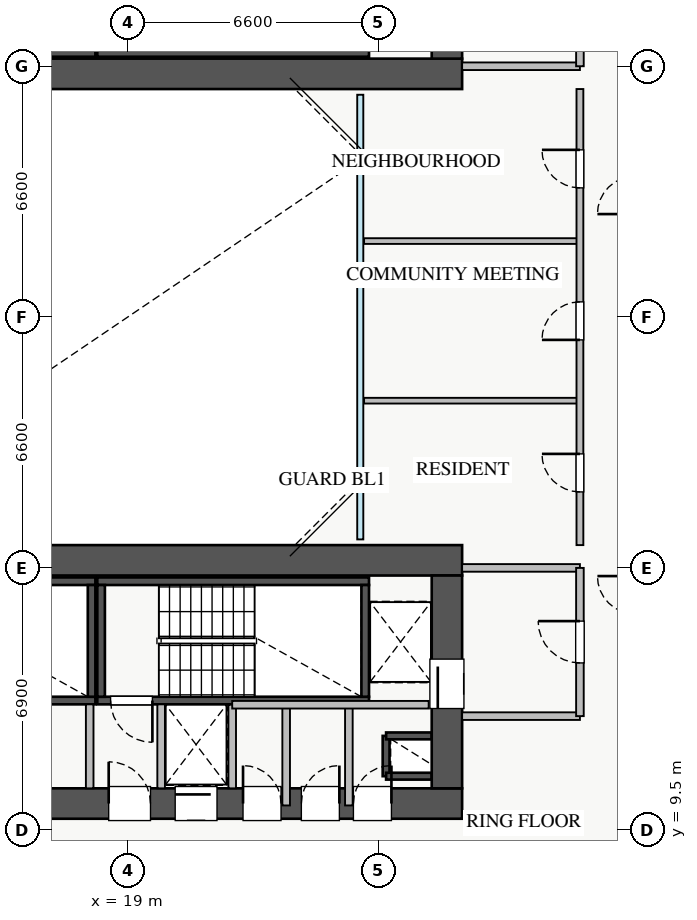
"""IFC4 building model, lengths in metres.
Left out: names, types, materials, properties, quantities, classifications, styles, units other than length and angle.
Written with IfcOpenShell. Run it as: python <this file> out.ifc"""

import sys

from ifc_helpers import new_model, si_unit, direction, frame, frame_2d, origin, place, context, subcontext, project, spatial, rectangle, extrude, source, transform, mapped, element, fill, save


model = new_model("IFC4")
c1 = context("Model", 3, precision=1e-05, world=origin(), true_north=direction((0.0, 1.0)))
c2 = subcontext(c1, "Body", "Model", "MODEL_VIEW")
j1 = project(units=[si_unit("LENGTHUNIT", "METRE"), si_unit("PLANEANGLEUNIT", "RADIAN")], contexts=[c1])
p1 = place(None, origin())
s1 = spatial("IfcSite", under=j1, at=p1, CompositionType="ELEMENT")
p2 = place(p1, origin())
s2 = spatial("IfcBuilding", under=s1, at=p2, CompositionType="ELEMENT")
p3 = place(p2, frame((0.0, 0.0, 63.25)))
s3 = spatial("IfcBuildingStorey", under=s2, at=p3, CompositionType="ELEMENT", Elevation=63.25)
p4 = place(p3, frame((25.8, 10.92, 0.0), z_axis=(0.0, 0.0, 1.0), x_axis=(0.0, 1.0, 0.0)))
e1 = element("IfcWall", 1, at=p4, inside=s3, PredefinedType="SHEAR", context=c2, shape_type="SweptSolid", body=[
    extrude(rectangle(XDim=1.06, YDim=0.18, at=frame_2d((0.53, 0.0))), origin(), (0.0, 0.0, 1.0), 3.07),
])
for number, where, z_axis, x_axis in (
    (2, (25.8, 11.98, 0.0), (0.0, 0.0, 1.0), (1.0, 0.0, 0.0)),
    (3, (25.8, 10.92, 0.0), (0.0, 0.0, 1.0), (1.0, 0.0, 0.0)),
):
    element("IfcWall", number, at=place(p3, frame(where, z_axis=z_axis, x_axis=x_axis)), inside=s3, PredefinedType="SHEAR", context=c2, shape_type="SweptSolid", body=[
        extrude(rectangle(XDim=1.2, YDim=0.18, at=frame_2d((0.6, 0.0))), origin(), (0.0, 0.0, 1.0), 3.07),
    ])
p5 = place(p3, frame((19.88, 12.8, 0.0), z_axis=(0.0, 0.0, 1.0), x_axis=(1.0, 0.0, 0.0)))
e4 = element("IfcWall", 4, at=p5, inside=s3, PredefinedType="SHEAR", context=c2, shape_type="SweptSolid", body=[
    extrude(rectangle(XDim=1.87, YDim=0.18, at=frame_2d((0.935, 0.0))), origin(), (0.0, 0.0, 1.0), 3.07),
])
p6 = place(p3, frame((11.0, 29.95, 0.0), z_axis=(0.0, 0.0, 1.0), x_axis=(1.0, 0.0, 0.0)))
e5 = element("IfcWall", 5, at=p6, inside=s3, PredefinedType="SHEAR", context=c2, shape_type="SweptSolid", body=[
    extrude(rectangle(XDim=7.15, YDim=0.2, at=frame_2d((3.575, 0.0))), origin(), (0.0, 0.0, 1.0), 3.25),
])
p7 = place(p3, frame((18.2, 29.95, 0.0), z_axis=(0.0, 0.0, 1.0), x_axis=(1.0, 0.0, 0.0)))
e6 = element("IfcWall", 6, at=p7, inside=s3, PredefinedType="SHEAR", context=c2, shape_type="SweptSolid", body=[
    extrude(rectangle(XDim=7.15, YDim=0.2, at=frame_2d((3.575, 0.0))), origin(), (0.0, 0.0, 1.0), 3.25),
])
p8 = place(p3, frame((11.0, 12.91, 0.0), z_axis=(0.0, 0.0, 1.0), x_axis=(1.0, 0.0, 0.0)))
e7 = element("IfcWall", 7, at=p8, inside=s3, PredefinedType="SHEAR", context=c2, shape_type="SweptSolid", body=[
    extrude(rectangle(XDim=7.15, YDim=0.2, at=frame_2d((3.575, 0.0))), origin(), (0.0, 0.0, 1.0), 3.25),
])
p9 = place(p8, frame((0.35, 0.0, 0.0)))
e8 = element("IfcOpeningElement", 8, at=p9, cuts=e7, PredefinedType="OPENING", context=c2, shape_type="SweptSolid", body=[
    extrude(rectangle(XDim=1.1, YDim=2.05, at=frame_2d((0.55, 1.025))), frame((0.0, 0.11, 0.0), z_axis=(0.0, -1.0, 0.0), x_axis=(1.0, 0.0, 0.0)), (0.0, 0.0, 1.0), 0.22),
])
p10 = place(p3, frame((11.0, 16.05, 0.0), z_axis=(0.0, 0.0, 1.0), x_axis=(1.0, 0.0, 0.0)))
e9 = element("IfcWall", 9, at=p10, inside=s3, PredefinedType="SHEAR", context=c2, shape_type="SweptSolid", body=[
    extrude(rectangle(XDim=7.15, YDim=0.2, at=frame_2d((3.575, 0.0))), origin(), (0.0, 0.0, 1.0), 3.25),
])
p11 = place(p3, frame((18.05, 13.01, 0.0), z_axis=(0.0, 0.0, 1.0), x_axis=(0.0, 1.0, 0.0)))
e10 = element("IfcWall", 10, at=p11, inside=s3, PredefinedType="SHEAR", context=c2, shape_type="SweptSolid", body=[
    extrude(rectangle(XDim=2.94, YDim=0.2, at=frame_2d((1.47, 0.0))), origin(), (0.0, 0.0, 1.0), 3.25),
])
p12 = place(p3, frame((18.2, 12.91, 0.0), z_axis=(0.0, 0.0, 1.0), x_axis=(1.0, 0.0, 0.0)))
e11 = element("IfcWall", 11, at=p12, inside=s3, PredefinedType="SHEAR", context=c2, shape_type="SweptSolid", body=[
    extrude(rectangle(XDim=7.15, YDim=0.2, at=frame_2d((3.575, 0.0))), origin(), (0.0, 0.0, 1.0), 3.25),
])
p13 = place(p12, frame((0.35, 0.0, 0.0)))
e12 = element("IfcOpeningElement", 12, at=p13, cuts=e11, PredefinedType="OPENING", context=c2, shape_type="SweptSolid", body=[
    extrude(rectangle(XDim=1.1, YDim=2.05, at=frame_2d((0.55, 1.025))), frame((0.0, 0.11, 0.0), z_axis=(0.0, -1.0, 0.0), x_axis=(1.0, 0.0, 0.0)), (0.0, 0.0, 1.0), 0.22),
])
p14 = place(p3, frame((18.2, 16.05, 0.0), z_axis=(0.0, 0.0, 1.0), x_axis=(1.0, 0.0, 0.0)))
e13 = element("IfcWall", 13, at=p14, inside=s3, PredefinedType="SHEAR", context=c2, shape_type="SweptSolid", body=[
    extrude(rectangle(XDim=7.15, YDim=0.2, at=frame_2d((3.575, 0.0))), origin(), (0.0, 0.0, 1.0), 3.25),
])
for number, where, z_axis, x_axis in (
    (14, (18.3, 13.01, 0.0), (0.0, 0.0, 1.0), (0.0, 1.0, 0.0)),
    (15, (25.25, 13.01, 0.0), (0.0, 0.0, 1.0), (0.0, 1.0, 0.0)),
):
    element("IfcWall", number, at=place(p3, frame(where, z_axis=z_axis, x_axis=x_axis)), inside=s3, PredefinedType="SHEAR", context=c2, shape_type="SweptSolid", body=[
        extrude(rectangle(XDim=2.94, YDim=0.2, at=frame_2d((1.47, 0.0))), origin(), (0.0, 0.0, 1.0), 3.25),
    ])
p15 = place(p3, frame((10.2, 29.4, 0.0), z_axis=(0.0, 0.0, 1.0), x_axis=(1.0, 0.0, 0.0)))
e16 = element("IfcWall", 16, at=p15, inside=s3, PredefinedType="SHEAR", context=c2, shape_type="SweptSolid", body=[
    extrude(rectangle(XDim=17.6, YDim=0.8, at=frame_2d((8.8, 0.0))), origin(), (0.0, 0.0, 1.0), 3.25),
])
p16 = place(p3, frame((27.4, 29.8, 0.0), z_axis=(0.0, 0.0, 1.0), x_axis=(0.0, 1.0, 0.0)))
e17 = element("IfcWall", 17, at=p16, inside=s3, PredefinedType="SHEAR", context=c2, shape_type="SweptSolid", body=[
    extrude(rectangle(XDim=5.6, YDim=0.8, at=frame_2d((2.8, 0.0))), origin(), (0.0, 0.0, 1.0), 3.25),
])
p17 = place(p16, frame((1.1, 0.0, 0.0)))
e18 = element("IfcOpeningElement", 18, at=p17, cuts=e17, PredefinedType="OPENING", context=c2, shape_type="SweptSolid", body=[
    extrude(rectangle(XDim=1.3, YDim=2.05, at=frame_2d((0.65, 1.025))), frame((0.0, 0.41, 0.0), z_axis=(0.0, -1.0, 0.0), x_axis=(1.0, 0.0, 0.0)), (0.0, 0.0, 1.0), 0.82),
])
p18 = place(p3, frame((10.2, 10.2, 0.0), z_axis=(0.0, 0.0, 1.0), x_axis=(1.0, 0.0, 0.0)))
e19 = element("IfcWall", 19, at=p18, inside=s3, PredefinedType="SHEAR", context=c2, shape_type="SweptSolid", body=[
    extrude(rectangle(XDim=17.6, YDim=0.8, at=frame_2d((8.8, 0.0))), origin(), (0.0, 0.0, 1.0), 3.25),
])
p19 = place(p18, frame((1.15, 0.0, 0.0)))
e20 = element("IfcOpeningElement", 20, at=p19, cuts=e19, PredefinedType="OPENING", context=c2, shape_type="SweptSolid", body=[
    extrude(rectangle(XDim=1.1, YDim=2.05, at=frame_2d((0.55, 1.025))), frame((0.0, 0.41, 0.0), z_axis=(0.0, -1.0, 0.0), x_axis=(1.0, 0.0, 0.0)), (0.0, 0.0, 1.0), 0.82),
])
p20 = place(p18, frame((8.3, 0.0, 0.0)))
e21 = element("IfcOpeningElement", 21, at=p20, cuts=e19, PredefinedType="OPENING", context=c2, shape_type="SweptSolid", body=[
    extrude(rectangle(XDim=1.1, YDim=2.05, at=frame_2d((0.55, 1.025))), frame((0.0, 0.41, 0.0), z_axis=(0.0, -1.0, 0.0), x_axis=(1.0, 0.0, 0.0)), (0.0, 0.0, 1.0), 0.82),
])
p21 = place(p18, frame((10.05, 0.0, 0.0)))
e22 = element("IfcOpeningElement", 22, at=p21, cuts=e19, PredefinedType="OPENING", context=c2, shape_type="SweptSolid", body=[
    extrude(rectangle(XDim=1.1, YDim=2.05, at=frame_2d((0.55, 1.025))), frame((0.0, 0.41, 0.0), z_axis=(0.0, -1.0, 0.0), x_axis=(1.0, 0.0, 0.0)), (0.0, 0.0, 1.0), 0.82),
])
p22 = place(p18, frame((14.74, 0.0, 0.0)))
e23 = element("IfcOpeningElement", 23, at=p22, cuts=e19, PredefinedType="OPENING", context=c2, shape_type="SweptSolid", body=[
    extrude(rectangle(XDim=1.0, YDim=2.05, at=frame_2d((0.5, 1.025))), frame((0.0, 0.41, 0.0), z_axis=(0.0, -1.0, 0.0), x_axis=(1.0, 0.0, 0.0)), (0.0, 0.0, 1.0), 0.82),
])
p23 = place(p18, frame((11.835, 0.0, 0.0)))
e24 = element("IfcOpeningElement", 24, at=p23, cuts=e19, PredefinedType="OPENING", context=c2, shape_type="SweptSolid", body=[
    extrude(rectangle(XDim=1.0, YDim=2.05, at=frame_2d((0.5, 1.025))), frame((0.0, 0.41, 0.0), z_axis=(0.0, -1.0, 0.0), x_axis=(1.0, 0.0, 0.0)), (0.0, 0.0, 1.0), 0.82),
])
p24 = place(p18, frame((13.37, 0.0, 0.0)))
e25 = element("IfcOpeningElement", 25, at=p24, cuts=e19, PredefinedType="OPENING", context=c2, shape_type="SweptSolid", body=[
    extrude(rectangle(XDim=1.0, YDim=2.05, at=frame_2d((0.5, 1.025))), frame((0.0, 0.41, 0.0), z_axis=(0.0, -1.0, 0.0), x_axis=(1.0, 0.0, 0.0)), (0.0, 0.0, 1.0), 0.82),
])
p25 = place(p3, frame((10.2, 16.6, 0.0), z_axis=(0.0, 0.0, 1.0), x_axis=(1.0, 0.0, 0.0)))
e26 = element("IfcWall", 26, at=p25, inside=s3, PredefinedType="SHEAR", context=c2, shape_type="SweptSolid", body=[
    extrude(rectangle(XDim=17.6, YDim=0.8, at=frame_2d((8.8, 0.0))), origin(), (0.0, 0.0, 1.0), 3.25),
])
p26 = place(p3, frame((27.4, 10.6, 0.0), z_axis=(0.0, 0.0, 1.0), x_axis=(0.0, 1.0, 0.0)))
e27 = element("IfcWall", 27, at=p26, inside=s3, PredefinedType="SHEAR", context=c2, shape_type="SweptSolid", body=[
    extrude(rectangle(XDim=5.6, YDim=0.8, at=frame_2d((2.8, 0.0))), origin(), (0.0, 0.0, 1.0), 3.25),
])
p27 = place(p26, frame((2.1, 0.0, 0.0)))
e28 = element("IfcOpeningElement", 28, at=p27, cuts=e27, PredefinedType="OPENING", context=c2, shape_type="SweptSolid", body=[
    extrude(rectangle(XDim=1.3, YDim=2.05, at=frame_2d((0.65, 1.025))), frame((0.0, 0.41, 0.0), z_axis=(0.0, -1.0, 0.0), x_axis=(1.0, 0.0, 0.0)), (0.0, 0.0, 1.0), 0.82),
])
p28 = place(p3, frame((27.8, 29.6, 0.0), z_axis=(0.0, 0.0, 1.0), x_axis=(1.0, 0.0, 0.0)))
e29 = element("IfcWall", 29, at=p28, inside=s3, PredefinedType="PARTITIONING", context=c2, shape_type="SweptSolid", body=[
    extrude(rectangle(XDim=3.1, YDim=0.2, at=frame_2d((1.55, 0.0))), origin(), (0.0, 0.0, 1.0), 3.07),
])
p29 = place(p3, frame((30.9, 29.6, 0.0), z_axis=(0.0, 0.0, 1.0), x_axis=(0.0, 1.0, 0.0)))
e30 = element("IfcWall", 30, at=p29, inside=s3, PredefinedType="PARTITIONING", context=c2, shape_type="SweptSolid", body=[
    extrude(rectangle(XDim=3.9, YDim=0.2, at=frame_2d((1.95, 0.0))), origin(), (0.0, 0.0, 1.0), 3.07),
])
p30 = place(p29, frame((1.4, 0.0, 0.0)))
e31 = element("IfcOpeningElement", 31, at=p30, cuts=e30, PredefinedType="OPENING", context=c2, shape_type="SweptSolid", body=[
    extrude(rectangle(XDim=1.1, YDim=2.05, at=frame_2d((0.55, 1.025))), frame((0.0, 0.11, 0.0), z_axis=(0.0, -1.0, 0.0), x_axis=(1.0, 0.0, 0.0)), (0.0, 0.0, 1.0), 0.22),
])
for number, where, z_axis, x_axis in (
    (32, (27.8, 16.4, 0.0), (0.0, 0.0, 1.0), (1.0, 0.0, 0.0)),
    (33, (27.8, 12.5, 0.0), (0.0, 0.0, 1.0), (1.0, 0.0, 0.0)),
):
    element("IfcWall", number, at=place(p3, frame(where, z_axis=z_axis, x_axis=x_axis)), inside=s3, PredefinedType="PARTITIONING", context=c2, shape_type="SweptSolid", body=[
        extrude(rectangle(XDim=3.1, YDim=0.2, at=frame_2d((1.55, 0.0))), origin(), (0.0, 0.0, 1.0), 3.07),
    ])
p31 = place(p3, frame((30.9, 12.5, 0.0), z_axis=(0.0, 0.0, 1.0), x_axis=(0.0, 1.0, 0.0)))
e34 = element("IfcWall", 34, at=p31, inside=s3, PredefinedType="PARTITIONING", context=c2, shape_type="SweptSolid", body=[
    extrude(rectangle(XDim=3.9, YDim=0.2, at=frame_2d((1.95, 0.0))), origin(), (0.0, 0.0, 1.0), 3.07),
])
p32 = place(p31, frame((1.4, 0.0, 0.0)))
e35 = element("IfcOpeningElement", 35, at=p32, cuts=e34, PredefinedType="OPENING", context=c2, shape_type="SweptSolid", body=[
    extrude(rectangle(XDim=1.1, YDim=2.05, at=frame_2d((0.55, 1.025))), frame((0.0, 0.11, 0.0), z_axis=(0.0, -1.0, 0.0), x_axis=(1.0, 0.0, 0.0)), (0.0, 0.0, 1.0), 0.22),
])
for number, where, z_axis, x_axis in (
    (36, (18.0, 10.6, 0.0), (0.0, 0.0, 1.0), (0.0, 1.0, 0.0)),
    (37, (19.88, 10.6, 0.0), (0.0, 0.0, 1.0), (0.0, 1.0, 0.0)),
):
    element("IfcWall", number, at=place(p3, frame(where, z_axis=z_axis, x_axis=x_axis)), inside=s3, PredefinedType="PARTITIONING", context=c2, shape_type="SweptSolid", body=[
        extrude(rectangle(XDim=2.21, YDim=0.2, at=frame_2d((1.105, 0.0))), origin(), (0.0, 0.0, 1.0), 3.07),
    ])
p33 = place(p3, frame((24.82, 10.15, 0.0), z_axis=(0.0, 0.0, 1.0), x_axis=(0.0, 1.0, 0.0)))
e38 = element("IfcWall", 38, at=p33, inside=s3, PredefinedType="PARTITIONING", context=c2, shape_type="SweptSolid", body=[
    extrude(rectangle(XDim=2.65, YDim=0.2, at=frame_2d((1.325, 0.0))), origin(), (0.0, 0.0, 1.0), 3.07),
])
p34 = place(p3, frame((21.75, 10.6, 0.0), z_axis=(0.0, 0.0, 1.0), x_axis=(0.0, 1.0, 0.0)))
e39 = element("IfcWall", 39, at=p34, inside=s3, PredefinedType="PARTITIONING", context=c2, shape_type="SweptSolid", body=[
    extrude(rectangle(XDim=2.2, YDim=0.2, at=frame_2d((1.1, 0.0))), origin(), (0.0, 0.0, 1.0), 3.07),
])
p35 = place(p3, frame((23.17, 10.15, 0.0), z_axis=(0.0, 0.0, 1.0), x_axis=(0.0, 1.0, 0.0)))
e40 = element("IfcWall", 40, at=p35, inside=s3, PredefinedType="PARTITIONING", context=c2, shape_type="SweptSolid", body=[
    extrude(rectangle(XDim=2.65, YDim=0.2, at=frame_2d((1.325, 0.0))), origin(), (0.0, 0.0, 1.0), 3.07),
])
p36 = place(p3, frame((21.75, 12.8, 0.0), z_axis=(0.0, 0.0, 1.0), x_axis=(1.0, 0.0, 0.0)))
e41 = element("IfcWall", 41, at=p36, inside=s3, PredefinedType="PARTITIONING", context=c2, shape_type="SweptSolid", body=[
    extrude(rectangle(XDim=5.17, YDim=0.2, at=frame_2d((2.585, 0.0))), origin(), (0.0, 0.0, 1.0), 3.07),
])
for number, where, z_axis, x_axis in (
    (42, (25.22, 20.8, 0.0), (0.0, 0.0, 1.0), (1.0, 0.0, 0.0)),
    (43, (25.22, 25.0, 0.0), (0.0, 0.0, 1.0), (1.0, 0.0, 0.0)),
):
    element("IfcWall", number, at=place(p3, frame(where, z_axis=z_axis, x_axis=x_axis)), inside=s3, PredefinedType="PARTITIONING", context=c2, shape_type="SweptSolid", body=[
        extrude(rectangle(XDim=5.68, YDim=0.15, at=frame_2d((2.84, 0.0))), origin(), (0.0, 0.0, 1.0), 3.07),
    ])
p37 = place(p3, frame((30.9, 17.0, 0.0), z_axis=(0.0, 0.0, 1.0), x_axis=(0.0, 1.0, 0.0)))
e44 = element("IfcWall", 44, at=p37, inside=s3, PredefinedType="PARTITIONING", context=c2, shape_type="SweptSolid", body=[
    extrude(rectangle(XDim=12.0, YDim=0.18, at=frame_2d((6.0, 0.0))), origin(), (0.0, 0.0, 1.0), 3.07),
])
p38 = place(p37, frame((1.4, 0.0, 0.0)))
e45 = element("IfcOpeningElement", 45, at=p38, cuts=e44, PredefinedType="OPENING", context=c2, shape_type="SweptSolid", body=[
    extrude(rectangle(XDim=1.0, YDim=2.05, at=frame_2d((0.5, 1.025))), frame((0.0, 0.1, 0.0), z_axis=(0.0, -1.0, 0.0), x_axis=(1.0, 0.0, 0.0)), (0.0, 0.0, 1.0), 0.2),
])
p39 = place(p37, frame((5.4, 0.0, 0.0)))
e46 = element("IfcOpeningElement", 46, at=p39, cuts=e44, PredefinedType="OPENING", context=c2, shape_type="SweptSolid", body=[
    extrude(rectangle(XDim=1.0, YDim=2.05, at=frame_2d((0.5, 1.025))), frame((0.0, 0.1, 0.0), z_axis=(0.0, -1.0, 0.0), x_axis=(1.0, 0.0, 0.0)), (0.0, 0.0, 1.0), 0.2),
])
p40 = place(p37, frame((9.4, 0.0, 0.0)))
e47 = element("IfcOpeningElement", 47, at=p40, cuts=e44, PredefinedType="OPENING", context=c2, shape_type="SweptSolid", body=[
    extrude(rectangle(XDim=1.0, YDim=2.05, at=frame_2d((0.5, 1.025))), frame((0.0, 0.1, 0.0), z_axis=(0.0, -1.0, 0.0), x_axis=(1.0, 0.0, 0.0)), (0.0, 0.0, 1.0), 0.2),
])
m1 = source(origin(), c2, "Body", "SweptSolid", [
    extrude(rectangle(XDim=1.3, YDim=2.05, at=frame_2d((0.65, 1.025))), frame((0.0, 0.025, 0.0), z_axis=(0.0, -1.0, 0.0), x_axis=(1.0, 0.0, 0.0)), (0.0, 0.0, 1.0), 0.05),
])
p41 = place(p27, origin())
e48 = element("IfcDoor", 48, at=p41, inside=s3, OperationType="SLIDING_TO_RIGHT", PredefinedType="DOOR", context=c2, shape_type="MappedRepresentation", body=[
    mapped(m1, transform((0.0, 0.0, 0.0), x_axis=(1.0, 0.0, 0.0), y_axis=(0.0, 1.0, 0.0), z_axis=(0.0, 0.0, 1.0), scale=1.0)),
])
fill(e28, e48)
m2 = source(origin(), c2, "Body", "SweptSolid", [
    extrude(rectangle(XDim=1.1, YDim=2.05, at=frame_2d((0.55, 1.025))), frame((0.0, 0.025, 0.0), z_axis=(0.0, -1.0, 0.0), x_axis=(1.0, 0.0, 0.0)), (0.0, 0.0, 1.0), 0.05),
])
p42 = place(p20, origin())
e49 = element("IfcDoor", 49, at=p42, inside=s3, OperationType="SINGLE_SWING_LEFT", PredefinedType="DOOR", context=c2, shape_type="MappedRepresentation", body=[
    mapped(m2, transform((0.0, 0.0, 0.0), x_axis=(1.0, 0.0, 0.0), y_axis=(0.0, 1.0, 0.0), z_axis=(0.0, 0.0, 1.0), scale=1.0)),
])
fill(e21, e49)
p43 = place(p13, frame((1.1, 0.0, 0.0), z_axis=(0.0, 0.0, 1.0), x_axis=(-1.0, 0.0, 0.0)))
e50 = element("IfcDoor", 50, at=p43, inside=s3, OperationType="SINGLE_SWING_RIGHT", PredefinedType="DOOR", context=c2, shape_type="MappedRepresentation", body=[
    mapped(m2, transform((0.0, 0.0, 0.0), x_axis=(1.0, 0.0, 0.0), y_axis=(0.0, 1.0, 0.0), z_axis=(0.0, 0.0, 1.0), scale=1.0)),
])
fill(e12, e50)
p44 = place(p21, origin())
e51 = element("IfcDoor", 51, at=p44, inside=s3, OperationType="SLIDING_TO_RIGHT", PredefinedType="DOOR", context=c2, shape_type="MappedRepresentation", body=[
    mapped(m2, transform((0.0, 0.0, 0.0), x_axis=(1.0, 0.0, 0.0), y_axis=(0.0, 1.0, 0.0), z_axis=(0.0, 0.0, 1.0), scale=1.0)),
])
fill(e22, e51)
m3 = source(origin(), c2, "Body", "SweptSolid", [
    extrude(rectangle(XDim=1.0, YDim=2.05, at=frame_2d((0.5, 1.025))), frame((0.0, 0.025, 0.0), z_axis=(0.0, -1.0, 0.0), x_axis=(1.0, 0.0, 0.0)), (0.0, 0.0, 1.0), 0.05),
])
p45 = place(p22, origin())
e52 = element("IfcDoor", 52, at=p45, inside=s3, OperationType="SINGLE_SWING_RIGHT", PredefinedType="DOOR", context=c2, shape_type="MappedRepresentation", body=[
    mapped(m3, transform((0.0, 0.0, 0.0), x_axis=(1.0, 0.0, 0.0), y_axis=(0.0, 1.0, 0.0), z_axis=(0.0, 0.0, 1.0), scale=1.0)),
])
fill(e23, e52)
p46 = place(p23, origin())
e53 = element("IfcDoor", 53, at=p46, inside=s3, OperationType="SINGLE_SWING_LEFT", PredefinedType="DOOR", context=c2, shape_type="MappedRepresentation", body=[
    mapped(m3, transform((0.0, 0.0, 0.0), x_axis=(1.0, 0.0, 0.0), y_axis=(0.0, 1.0, 0.0), z_axis=(0.0, 0.0, 1.0), scale=1.0)),
])
fill(e24, e53)
p47 = place(p24, origin())
e54 = element("IfcDoor", 54, at=p47, inside=s3, OperationType="SINGLE_SWING_RIGHT", PredefinedType="DOOR", context=c2, shape_type="MappedRepresentation", body=[
    mapped(m3, transform((0.0, 0.0, 0.0), x_axis=(1.0, 0.0, 0.0), y_axis=(0.0, 1.0, 0.0), z_axis=(0.0, 0.0, 1.0), scale=1.0)),
])
fill(e25, e54)
p48 = place(p32, origin())
e55 = element("IfcDoor", 55, at=p48, inside=s3, OperationType="SINGLE_SWING_RIGHT", PredefinedType="DOOR", context=c2, shape_type="MappedRepresentation", body=[
    mapped(m2, transform((0.0, 0.0, 0.0), x_axis=(1.0, 0.0, 0.0), y_axis=(0.0, 1.0, 0.0), z_axis=(0.0, 0.0, 1.0), scale=1.0)),
])
fill(e35, e55)
p49 = place(p38, origin())
e56 = element("IfcDoor", 56, at=p49, inside=s3, OperationType="SINGLE_SWING_RIGHT", PredefinedType="DOOR", context=c2, shape_type="MappedRepresentation", body=[
    mapped(m3, transform((0.0, 0.0, 0.0), x_axis=(1.0, 0.0, 0.0), y_axis=(0.0, 1.0, 0.0), z_axis=(0.0, 0.0, 1.0), scale=1.0)),
])
fill(e45, e56)
p50 = place(p39, origin())
e57 = element("IfcDoor", 57, at=p50, inside=s3, OperationType="SINGLE_SWING_LEFT", PredefinedType="DOOR", context=c2, shape_type="MappedRepresentation", body=[
    mapped(m3, transform((0.0, 0.0, 0.0), x_axis=(1.0, 0.0, 0.0), y_axis=(0.0, 1.0, 0.0), z_axis=(0.0, 0.0, 1.0), scale=1.0)),
])
fill(e46, e57)
p51 = place(p40, origin())
e58 = element("IfcDoor", 58, at=p51, inside=s3, OperationType="SINGLE_SWING_RIGHT", PredefinedType="DOOR", context=c2, shape_type="MappedRepresentation", body=[
    mapped(m3, transform((0.0, 0.0, 0.0), x_axis=(1.0, 0.0, 0.0), y_axis=(0.0, 1.0, 0.0), z_axis=(0.0, 0.0, 1.0), scale=1.0)),
])
fill(e47, e58)
save(model, sys.argv[1])
